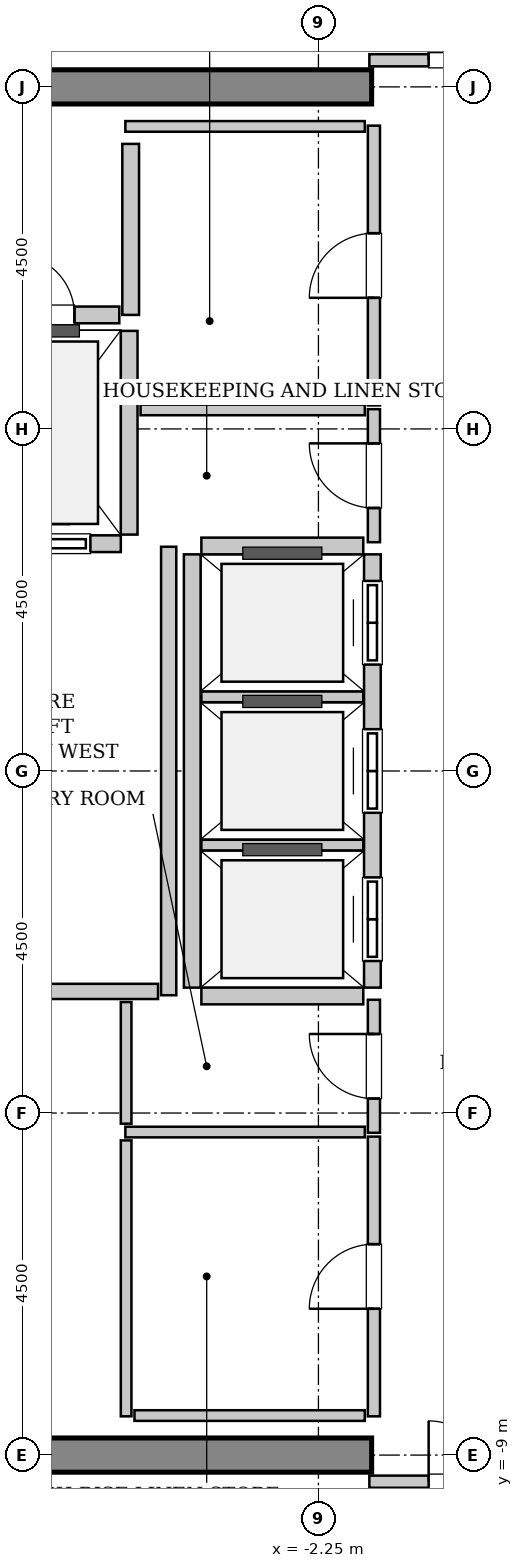
"""IFC4 building model, lengths in metres.
Left out: names, types, materials, properties, quantities, classifications, styles, units other than length and angle.
Written with IfcOpenShell. Run it as: python <this file> out.ifc"""

import sys

from ifc_helpers import new_model, si_unit, direction, frame, frame_2d, origin, place, context, subcontext, project, spatial, rectangle, extrude, source, transform, mapped, element, fill, save


model = new_model("IFC4")
c1 = context("Model", 3, precision=1e-05, world=origin(), true_north=direction((0.0, 1.0)))
c2 = subcontext(c1, "Body", "Model", "MODEL_VIEW")
j1 = project(units=[si_unit("LENGTHUNIT", "METRE"), si_unit("PLANEANGLEUNIT", "RADIAN")], contexts=[c1])
p1 = place(None, origin())
s1 = spatial("IfcSite", under=j1, at=p1, CompositionType="ELEMENT")
p2 = place(p1, origin())
s2 = spatial("IfcBuilding", under=s1, at=p2, CompositionType="ELEMENT")
p3 = place(p2, frame((0.0, 0.0, 295.0)))
s3 = spatial("IfcBuildingStorey", under=s2, at=p3, CompositionType="ELEMENT", Elevation=295.0)
m1 = source(origin(), c2, "Body", "SweptSolid", [
    extrude(rectangle(XDim=9.925, YDim=0.45, at=frame_2d((4.962, 0.0))), origin(), (0.0, 0.0, 1.0), 3.8),
])
for number, where, z_axis, x_axis in (
    (1, (-11.475, 9.0, 0.0), (0.0, 0.0, 1.0), (1.0, 0.0, 0.0)),
    (2, (-11.475, -9.0, 0.0), (0.0, 0.0, 1.0), (1.0, 0.0, 0.0)),
):
    element("IfcWall", number, at=place(p3, frame(where, z_axis=z_axis, x_axis=x_axis)), inside=s3, PredefinedType="SHEAR", context=c2, shape_type="MappedRepresentation", body=[
        mapped(m1, transform((0.0, 0.0, 0.0), x_axis=(1.0, 0.0, 0.0), y_axis=(0.0, 1.0, 0.0), z_axis=(0.0, 0.0, 1.0), scale=1.0)),
    ])
m2 = source(origin(), c2, "Body", "SweptSolid", [
    extrude(rectangle(XDim=2.0, YDim=0.22, at=frame_2d((1.0, 0.0))), origin(), (0.0, 0.0, 1.0), 3.535),
])
p4 = place(p3, frame((-6.85, 2.99, 0.0), z_axis=(0.0, 0.0, 1.0), x_axis=(1.0, 0.0, 0.0)))
e3 = element("IfcWall", 3, at=p4, inside=s3, PredefinedType="SOLIDWALL", context=c2, shape_type="MappedRepresentation", body=[
    mapped(m2, transform((0.0, 0.0, 0.0), x_axis=(1.0, 0.0, 0.0), y_axis=(0.0, 1.0, 0.0), z_axis=(0.0, 0.0, 1.0), scale=1.0)),
])
p5 = place(p4, frame((0.4, 0.0, 0.0)))
e4 = element("IfcOpeningElement", 4, at=p5, cuts=e3, PredefinedType="OPENING", context=c2, shape_type="SweptSolid", body=[
    extrude(rectangle(XDim=1.2, YDim=2.2, at=frame_2d((0.6, 1.1))), frame((0.0, 0.12, 0.0), z_axis=(0.0, -1.0, 0.0), x_axis=(1.0, 0.0, 0.0)), (0.0, 0.0, 1.0), 0.24),
])
m3 = source(origin(), c2, "Body", "SweptSolid", [
    extrude(rectangle(XDim=2.68, YDim=0.22, at=frame_2d((1.34, 0.0))), origin(), (0.0, 0.0, 1.0), 3.535),
])
p6 = place(p3, frame((-4.74, 3.11, 0.0), z_axis=(0.0, 0.0, 1.0), x_axis=(0.0, 1.0, 0.0)))
e5 = element("IfcWall", 5, at=p6, inside=s3, PredefinedType="SOLIDWALL", context=c2, shape_type="MappedRepresentation", body=[
    mapped(m3, transform((0.0, 0.0, 0.0), x_axis=(1.0, 0.0, 0.0), y_axis=(0.0, 1.0, 0.0), z_axis=(0.0, 0.0, 1.0), scale=1.0)),
])
m4 = source(origin(), c2, "Body", "SweptSolid", [
    extrude(rectangle(XDim=5.7, YDim=0.22, at=frame_2d((2.85, 0.0))), origin(), (0.0, 0.0, 1.0), 3.535),
])
p7 = place(p3, frame((-1.54, -2.85, 0.0), z_axis=(0.0, 0.0, 1.0), x_axis=(0.0, 1.0, 0.0)))
e6 = element("IfcWall", 6, at=p7, inside=s3, PredefinedType="SOLIDWALL", context=c2, shape_type="MappedRepresentation", body=[
    mapped(m4, transform((0.0, 0.0, 0.0), x_axis=(1.0, 0.0, 0.0), y_axis=(0.0, 1.0, 0.0), z_axis=(0.0, 0.0, 1.0), scale=1.0)),
])
p8 = place(p7, frame((0.35, 0.0, 0.0)))
e7 = element("IfcOpeningElement", 7, at=p8, cuts=e6, PredefinedType="OPENING", context=c2, shape_type="SweptSolid", body=[
    extrude(rectangle(XDim=1.1, YDim=2.2, at=frame_2d((0.55, 1.1))), frame((0.0, 0.12, 0.0), z_axis=(0.0, -1.0, 0.0), x_axis=(1.0, 0.0, 0.0)), (0.0, 0.0, 1.0), 0.24),
])
p9 = place(p7, frame((2.3, 0.0, 0.0)))
e8 = element("IfcOpeningElement", 8, at=p9, cuts=e6, PredefinedType="OPENING", context=c2, shape_type="SweptSolid", body=[
    extrude(rectangle(XDim=1.1, YDim=2.2, at=frame_2d((0.55, 1.1))), frame((0.0, 0.12, 0.0), z_axis=(0.0, -1.0, 0.0), x_axis=(1.0, 0.0, 0.0)), (0.0, 0.0, 1.0), 0.24),
])
p10 = place(p7, frame((4.25, 0.0, 0.0)))
e9 = element("IfcOpeningElement", 9, at=p10, cuts=e6, PredefinedType="OPENING", context=c2, shape_type="SweptSolid", body=[
    extrude(rectangle(XDim=1.1, YDim=2.2, at=frame_2d((0.55, 1.1))), frame((0.0, 0.12, 0.0), z_axis=(0.0, -1.0, 0.0), x_axis=(1.0, 0.0, 0.0)), (0.0, 0.0, 1.0), 0.24),
])
p11 = place(p3, frame((-3.91, 2.85, 0.0), z_axis=(0.0, 0.0, 1.0), x_axis=(0.0, -1.0, 0.0)))
e10 = element("IfcWall", 10, at=p11, inside=s3, PredefinedType="SOLIDWALL", context=c2, shape_type="MappedRepresentation", body=[
    mapped(m4, transform((0.0, 0.0, 0.0), x_axis=(1.0, 0.0, 0.0), y_axis=(0.0, 1.0, 0.0), z_axis=(0.0, 0.0, 1.0), scale=1.0)),
])
m5 = source(origin(), c2, "Body", "SweptSolid", [
    extrude(rectangle(XDim=2.13, YDim=0.22, at=frame_2d((1.065, 0.0))), origin(), (0.0, 0.0, 1.0), 3.535),
])
p12 = place(p3, frame((-3.79, -2.96, 0.0), z_axis=(0.0, 0.0, 1.0), x_axis=(1.0, 0.0, 0.0)))
e11 = element("IfcWall", 11, at=p12, inside=s3, PredefinedType="SOLIDWALL", context=c2, shape_type="MappedRepresentation", body=[
    mapped(m5, transform((0.0, 0.0, 0.0), x_axis=(1.0, 0.0, 0.0), y_axis=(0.0, 1.0, 0.0), z_axis=(0.0, 0.0, 1.0), scale=1.0)),
])
m6 = source(origin(), c2, "Body", "SweptSolid", [
    extrude(rectangle(XDim=2.13, YDim=0.14, at=frame_2d((1.065, 0.0))), origin(), (0.0, 0.0, 1.0), 3.535),
])
for number, where, z_axis, x_axis in (
    (12, (-3.79, -0.975, 0.0), (0.0, 0.0, 1.0), (1.0, 0.0, 0.0)),
    (13, (-3.79, 0.975, 0.0), (0.0, 0.0, 1.0), (1.0, 0.0, 0.0)),
):
    element("IfcWall", number, at=place(p3, frame(where, z_axis=z_axis, x_axis=x_axis)), inside=s3, PredefinedType="PARTITIONING", context=c2, shape_type="MappedRepresentation", body=[
        mapped(m6, transform((0.0, 0.0, 0.0), x_axis=(1.0, 0.0, 0.0), y_axis=(0.0, 1.0, 0.0), z_axis=(0.0, 0.0, 1.0), scale=1.0)),
    ])
p13 = place(p3, frame((-1.66, 2.96, 0.0), z_axis=(0.0, 0.0, 1.0), x_axis=(-1.0, 0.0, 0.0)))
e14 = element("IfcWall", 14, at=p13, inside=s3, PredefinedType="SOLIDWALL", context=c2, shape_type="MappedRepresentation", body=[
    mapped(m5, transform((0.0, 0.0, 0.0), x_axis=(1.0, 0.0, 0.0), y_axis=(0.0, 1.0, 0.0), z_axis=(0.0, 0.0, 1.0), scale=1.0)),
])
m7 = source(origin(), c2, "Body", "SweptSolid", [
    extrude(rectangle(XDim=2.25, YDim=0.22, at=frame_2d((1.125, 0.0))), origin(), (0.0, 0.0, 1.0), 3.535),
])
p14 = place(p3, frame((-4.72, 6.0, 0.0), z_axis=(0.0, 0.0, 1.0), x_axis=(0.0, 1.0, 0.0)))
e15 = element("IfcWall", 15, at=p14, inside=s3, PredefinedType="SOLIDWALL", context=c2, shape_type="MappedRepresentation", body=[
    mapped(m7, transform((0.0, 0.0, 0.0), x_axis=(1.0, 0.0, 0.0), y_axis=(0.0, 1.0, 0.0), z_axis=(0.0, 0.0, 1.0), scale=1.0)),
])
m8 = source(origin(), c2, "Body", "SweptSolid", [
    extrude(rectangle(XDim=1.98, YDim=0.22, at=frame_2d((0.99, 0.0))), origin(), (0.0, 0.0, 1.0), 3.535),
])
p15 = place(p3, frame((-6.85, 6.0, 0.0), z_axis=(0.0, 0.0, 1.0), x_axis=(1.0, 0.0, 0.0)))
e16 = element("IfcWall", 16, at=p15, inside=s3, PredefinedType="SOLIDWALL", context=c2, shape_type="MappedRepresentation", body=[
    mapped(m8, transform((0.0, 0.0, 0.0), x_axis=(1.0, 0.0, 0.0), y_axis=(0.0, 1.0, 0.0), z_axis=(0.0, 0.0, 1.0), scale=1.0)),
])
p16 = place(p15, frame((0.59, 0.0, 0.0)))
e17 = element("IfcOpeningElement", 17, at=p16, cuts=e16, PredefinedType="OPENING", context=c2, shape_type="SweptSolid", body=[
    extrude(rectangle(XDim=0.8, YDim=2.0, at=frame_2d((0.4, 1.0))), frame((0.0, 0.12, 0.0), z_axis=(0.0, -1.0, 0.0), x_axis=(1.0, 0.0, 0.0)), (0.0, 0.0, 1.0), 0.24),
])
m9 = source(origin(), c2, "Body", "SweptSolid", [
    extrude(rectangle(XDim=5.9, YDim=0.2, at=frame_2d((2.95, 0.0))), origin(), (0.0, 0.0, 1.0), 3.535),
])
p17 = place(p3, frame((-4.22, -2.95, 0.0), z_axis=(0.0, 0.0, 1.0), x_axis=(0.0, 1.0, 0.0)))
e18 = element("IfcWall", 18, at=p17, inside=s3, PredefinedType="PARTITIONING", context=c2, shape_type="MappedRepresentation", body=[
    mapped(m9, transform((0.0, 0.0, 0.0), x_axis=(1.0, 0.0, 0.0), y_axis=(0.0, 1.0, 0.0), z_axis=(0.0, 0.0, 1.0), scale=1.0)),
])
m10 = source(origin(), c2, "Body", "SweptSolid", [
    extrude(rectangle(XDim=2.9, YDim=0.2, at=frame_2d((1.45, 0.0))), origin(), (0.0, 0.0, 1.0), 3.535),
])
p18 = place(p3, frame((-7.26, -2.9, 0.0), z_axis=(0.0, 0.0, 1.0), x_axis=(1.0, 0.0, 0.0)))
e19 = element("IfcWall", 19, at=p18, inside=s3, PredefinedType="PARTITIONING", context=c2, shape_type="MappedRepresentation", body=[
    mapped(m10, transform((0.0, 0.0, 0.0), x_axis=(1.0, 0.0, 0.0), y_axis=(0.0, 1.0, 0.0), z_axis=(0.0, 0.0, 1.0), scale=1.0)),
])
m11 = source(origin(), c2, "Body", "SweptSolid", [
    extrude(rectangle(XDim=3.16, YDim=0.16, at=frame_2d((1.58, 0.0))), origin(), (0.0, 0.0, 1.0), 2.625),
])
p19 = place(p3, frame((-1.58, 9.35, 0.0), z_axis=(0.0, 0.0, 1.0), x_axis=(1.0, 0.0, 0.0)))
e20 = element("IfcWall", 20, at=p19, inside=s3, PredefinedType="PARTITIONING", context=c2, shape_type="MappedRepresentation", body=[
    mapped(m11, transform((0.0, 0.0, 0.0), x_axis=(1.0, 0.0, 0.0), y_axis=(0.0, 1.0, 0.0), z_axis=(0.0, 0.0, 1.0), scale=1.0)),
])
p20 = place(p19, frame((0.78, 0.0, 0.0)))
e21 = element("IfcOpeningElement", 21, at=p20, cuts=e20, PredefinedType="OPENING", context=c2, shape_type="SweptSolid", body=[
    extrude(rectangle(XDim=1.6, YDim=2.3, at=frame_2d((0.8, 1.15))), frame((0.0, 0.09, 0.0), z_axis=(0.0, -1.0, 0.0), x_axis=(1.0, 0.0, 0.0)), (0.0, 0.0, 1.0), 0.18),
])
p21 = place(p3, frame((-1.58, -9.35, 0.0), z_axis=(0.0, 0.0, 1.0), x_axis=(1.0, 0.0, 0.0)))
e22 = element("IfcWall", 22, at=p21, inside=s3, PredefinedType="PARTITIONING", context=c2, shape_type="MappedRepresentation", body=[
    mapped(m11, transform((0.0, 0.0, 0.0), x_axis=(1.0, 0.0, 0.0), y_axis=(0.0, 1.0, 0.0), z_axis=(0.0, 0.0, 1.0), scale=1.0)),
])
p22 = place(p21, frame((0.78, 0.0, 0.0)))
e23 = element("IfcOpeningElement", 23, at=p22, cuts=e22, PredefinedType="OPENING", context=c2, shape_type="SweptSolid", body=[
    extrude(rectangle(XDim=1.6, YDim=2.3, at=frame_2d((0.8, 1.15))), frame((0.0, 0.09, 0.0), z_axis=(0.0, -1.0, 0.0), x_axis=(1.0, 0.0, 0.0)), (0.0, 0.0, 1.0), 0.18),
])
m12 = source(origin(), c2, "Body", "SweptSolid", [
    extrude(rectangle(XDim=1.75, YDim=0.16, at=frame_2d((0.875, 0.0))), origin(), (0.0, 0.0, 1.0), 3.535),
])
p23 = place(p3, frame((-1.52, 3.01, 0.0), z_axis=(0.0, 0.0, 1.0), x_axis=(0.0, 1.0, 0.0)))
e24 = element("IfcWall", 24, at=p23, inside=s3, PredefinedType="PARTITIONING", context=c2, shape_type="MappedRepresentation", body=[
    mapped(m12, transform((0.0, 0.0, 0.0), x_axis=(1.0, 0.0, 0.0), y_axis=(0.0, 1.0, 0.0), z_axis=(0.0, 0.0, 1.0), scale=1.0)),
])
p24 = place(p23, frame((0.45, 0.0, 0.0)))
e25 = element("IfcOpeningElement", 25, at=p24, cuts=e24, PredefinedType="OPENING", context=c2, shape_type="SweptSolid", body=[
    extrude(rectangle(XDim=0.85, YDim=2.1, at=frame_2d((0.425, 1.05))), frame((0.0, 0.09, 0.0), z_axis=(0.0, -1.0, 0.0), x_axis=(1.0, 0.0, 0.0)), (0.0, 0.0, 1.0), 0.18),
])
m13 = source(origin(), c2, "Body", "SweptSolid", [
    extrude(rectangle(XDim=2.95, YDim=0.14, at=frame_2d((1.475, 0.0))), origin(), (0.0, 0.0, 1.0), 3.535),
])
p25 = place(p3, frame((-4.59, 4.75, 0.0), z_axis=(0.0, 0.0, 1.0), x_axis=(1.0, 0.0, 0.0)))
e26 = element("IfcWall", 26, at=p25, inside=s3, PredefinedType="PARTITIONING", context=c2, shape_type="MappedRepresentation", body=[
    mapped(m13, transform((0.0, 0.0, 0.0), x_axis=(1.0, 0.0, 0.0), y_axis=(0.0, 1.0, 0.0), z_axis=(0.0, 0.0, 1.0), scale=1.0)),
])
m14 = source(origin(), c2, "Body", "SweptSolid", [
    extrude(rectangle(XDim=3.68, YDim=0.16, at=frame_2d((1.84, 0.0))), origin(), (0.0, 0.0, 1.0), 3.535),
])
p26 = place(p3, frame((-1.52, 4.81, 0.0), z_axis=(0.0, 0.0, 1.0), x_axis=(0.0, 1.0, 0.0)))
e27 = element("IfcWall", 27, at=p26, inside=s3, PredefinedType="PARTITIONING", context=c2, shape_type="MappedRepresentation", body=[
    mapped(m14, transform((0.0, 0.0, 0.0), x_axis=(1.0, 0.0, 0.0), y_axis=(0.0, 1.0, 0.0), z_axis=(0.0, 0.0, 1.0), scale=1.0)),
])
p27 = place(p26, frame((1.415, 0.0, 0.0)))
e28 = element("IfcOpeningElement", 28, at=p27, cuts=e27, PredefinedType="OPENING", context=c2, shape_type="SweptSolid", body=[
    extrude(rectangle(XDim=0.85, YDim=2.1, at=frame_2d((0.425, 1.05))), frame((0.0, 0.09, 0.0), z_axis=(0.0, -1.0, 0.0), x_axis=(1.0, 0.0, 0.0)), (0.0, 0.0, 1.0), 0.18),
])
m15 = source(origin(), c2, "Body", "SweptSolid", [
    extrude(rectangle(XDim=3.15, YDim=0.14, at=frame_2d((1.575, 0.0))), origin(), (0.0, 0.0, 1.0), 3.535),
])
p28 = place(p3, frame((-4.79, 8.48, 0.0), z_axis=(0.0, 0.0, 1.0), x_axis=(1.0, 0.0, 0.0)))
e29 = element("IfcWall", 29, at=p28, inside=s3, PredefinedType="PARTITIONING", context=c2, shape_type="MappedRepresentation", body=[
    mapped(m15, transform((0.0, 0.0, 0.0), x_axis=(1.0, 0.0, 0.0), y_axis=(0.0, 1.0, 0.0), z_axis=(0.0, 0.0, 1.0), scale=1.0)),
])
p29 = place(p3, frame((-1.52, -4.76, 0.0), z_axis=(0.0, 0.0, 1.0), x_axis=(0.0, 1.0, 0.0)))
e30 = element("IfcWall", 30, at=p29, inside=s3, PredefinedType="PARTITIONING", context=c2, shape_type="MappedRepresentation", body=[
    mapped(m12, transform((0.0, 0.0, 0.0), x_axis=(1.0, 0.0, 0.0), y_axis=(0.0, 1.0, 0.0), z_axis=(0.0, 0.0, 1.0), scale=1.0)),
])
p30 = place(p29, frame((0.45, 0.0, 0.0)))
e31 = element("IfcOpeningElement", 31, at=p30, cuts=e30, PredefinedType="OPENING", context=c2, shape_type="SweptSolid", body=[
    extrude(rectangle(XDim=0.85, YDim=2.1, at=frame_2d((0.425, 1.05))), frame((0.0, 0.09, 0.0), z_axis=(0.0, -1.0, 0.0), x_axis=(1.0, 0.0, 0.0)), (0.0, 0.0, 1.0), 0.18),
])
p31 = place(p3, frame((-4.79, -4.75, 0.0), z_axis=(0.0, 0.0, 1.0), x_axis=(1.0, 0.0, 0.0)))
e32 = element("IfcWall", 32, at=p31, inside=s3, PredefinedType="PARTITIONING", context=c2, shape_type="MappedRepresentation", body=[
    mapped(m15, transform((0.0, 0.0, 0.0), x_axis=(1.0, 0.0, 0.0), y_axis=(0.0, 1.0, 0.0), z_axis=(0.0, 0.0, 1.0), scale=1.0)),
])
m16 = source(origin(), c2, "Body", "SweptSolid", [
    extrude(rectangle(XDim=1.6, YDim=0.14, at=frame_2d((0.8, 0.0))), origin(), (0.0, 0.0, 1.0), 3.535),
])
p32 = place(p3, frame((-4.78, -4.64, 0.0), z_axis=(0.0, 0.0, 1.0), x_axis=(0.0, 1.0, 0.0)))
e33 = element("IfcWall", 33, at=p32, inside=s3, PredefinedType="PARTITIONING", context=c2, shape_type="MappedRepresentation", body=[
    mapped(m16, transform((0.0, 0.0, 0.0), x_axis=(1.0, 0.0, 0.0), y_axis=(0.0, 1.0, 0.0), z_axis=(0.0, 0.0, 1.0), scale=1.0)),
])
p33 = place(p3, frame((-1.52, -8.49, 0.0), z_axis=(0.0, 0.0, 1.0), x_axis=(0.0, 1.0, 0.0)))
e34 = element("IfcWall", 34, at=p33, inside=s3, PredefinedType="PARTITIONING", context=c2, shape_type="MappedRepresentation", body=[
    mapped(m14, transform((0.0, 0.0, 0.0), x_axis=(1.0, 0.0, 0.0), y_axis=(0.0, 1.0, 0.0), z_axis=(0.0, 0.0, 1.0), scale=1.0)),
])
p34 = place(p33, frame((1.415, 0.0, 0.0)))
e35 = element("IfcOpeningElement", 35, at=p34, cuts=e34, PredefinedType="OPENING", context=c2, shape_type="SweptSolid", body=[
    extrude(rectangle(XDim=0.85, YDim=2.1, at=frame_2d((0.425, 1.05))), frame((0.0, 0.09, 0.0), z_axis=(0.0, -1.0, 0.0), x_axis=(1.0, 0.0, 0.0)), (0.0, 0.0, 1.0), 0.18),
])
m17 = source(origin(), c2, "Body", "SweptSolid", [
    extrude(rectangle(XDim=3.63, YDim=0.14, at=frame_2d((1.815, 0.0))), origin(), (0.0, 0.0, 1.0), 3.535),
])
p35 = place(p3, frame((-4.78, -8.49, 0.0), z_axis=(0.0, 0.0, 1.0), x_axis=(0.0, 1.0, 0.0)))
e36 = element("IfcWall", 36, at=p35, inside=s3, PredefinedType="PARTITIONING", context=c2, shape_type="MappedRepresentation", body=[
    mapped(m17, transform((0.0, 0.0, 0.0), x_axis=(1.0, 0.0, 0.0), y_axis=(0.0, 1.0, 0.0), z_axis=(0.0, 0.0, 1.0), scale=1.0)),
])
m18 = source(origin(), c2, "Body", "SweptSolid", [
    extrude(rectangle(XDim=3.03, YDim=0.14, at=frame_2d((1.515, 0.0))), origin(), (0.0, 0.0, 1.0), 3.535),
])
p36 = place(p3, frame((-4.67, -8.48, 0.0), z_axis=(0.0, 0.0, 1.0), x_axis=(1.0, 0.0, 0.0)))
e37 = element("IfcWall", 37, at=p36, inside=s3, PredefinedType="PARTITIONING", context=c2, shape_type="MappedRepresentation", body=[
    mapped(m18, transform((0.0, 0.0, 0.0), x_axis=(1.0, 0.0, 0.0), y_axis=(0.0, 1.0, 0.0), z_axis=(0.0, 0.0, 1.0), scale=1.0)),
])
m19 = source(origin(), c2, "Body", "SweptSolid", [
    extrude(rectangle(XDim=1.2, YDim=2.2, at=frame_2d((0.6, 1.1))), frame((0.0, 0.025, 0.0), z_axis=(0.0, -1.0, 0.0), x_axis=(1.0, 0.0, 0.0)), (0.0, 0.0, 1.0), 0.05),
])
p37 = place(p5, origin())
e38 = element("IfcDoor", 38, at=p37, inside=s3, OperationType="SLIDING_TO_LEFT", PredefinedType="DOOR", context=c2, shape_type="MappedRepresentation", body=[
    mapped(m19, transform((0.0, 0.0, 0.0), x_axis=(1.0, 0.0, 0.0), y_axis=(0.0, 1.0, 0.0), z_axis=(0.0, 0.0, 1.0), scale=1.0)),
])
fill(e4, e38)
m20 = source(origin(), c2, "Body", "SweptSolid", [
    extrude(rectangle(XDim=1.1, YDim=2.2, at=frame_2d((0.55, 1.1))), frame((0.0, 0.025, 0.0), z_axis=(0.0, -1.0, 0.0), x_axis=(1.0, 0.0, 0.0)), (0.0, 0.0, 1.0), 0.05),
])
p38 = place(p8, origin())
e39 = element("IfcDoor", 39, at=p38, inside=s3, OperationType="DOUBLE_DOOR_SLIDING", PredefinedType="DOOR", context=c2, shape_type="MappedRepresentation", body=[
    mapped(m20, transform((0.0, 0.0, 0.0), x_axis=(1.0, 0.0, 0.0), y_axis=(0.0, 1.0, 0.0), z_axis=(0.0, 0.0, 1.0), scale=1.0)),
])
fill(e7, e39)
p39 = place(p9, origin())
e40 = element("IfcDoor", 40, at=p39, inside=s3, OperationType="DOUBLE_DOOR_SLIDING", PredefinedType="DOOR", context=c2, shape_type="MappedRepresentation", body=[
    mapped(m20, transform((0.0, 0.0, 0.0), x_axis=(1.0, 0.0, 0.0), y_axis=(0.0, 1.0, 0.0), z_axis=(0.0, 0.0, 1.0), scale=1.0)),
])
fill(e8, e40)
p40 = place(p10, origin())
e41 = element("IfcDoor", 41, at=p40, inside=s3, OperationType="DOUBLE_DOOR_SLIDING", PredefinedType="DOOR", context=c2, shape_type="MappedRepresentation", body=[
    mapped(m20, transform((0.0, 0.0, 0.0), x_axis=(1.0, 0.0, 0.0), y_axis=(0.0, 1.0, 0.0), z_axis=(0.0, 0.0, 1.0), scale=1.0)),
])
fill(e9, e41)
m21 = source(origin(), c2, "Body", "SweptSolid", [
    extrude(rectangle(XDim=0.8, YDim=2.0, at=frame_2d((0.4, 1.0))), frame((0.0, 0.025, 0.0), z_axis=(0.0, -1.0, 0.0), x_axis=(1.0, 0.0, 0.0)), (0.0, 0.0, 1.0), 0.05),
])
p41 = place(p16, origin())
e42 = element("IfcDoor", 42, at=p41, inside=s3, OperationType="SINGLE_SWING_LEFT", PredefinedType="TRAPDOOR", context=c2, shape_type="MappedRepresentation", body=[
    mapped(m21, transform((0.0, 0.0, 0.0), x_axis=(1.0, 0.0, 0.0), y_axis=(0.0, 1.0, 0.0), z_axis=(0.0, 0.0, 1.0), scale=1.0)),
])
fill(e17, e42)
m22 = source(origin(), c2, "Body", "SweptSolid", [
    extrude(rectangle(XDim=1.6, YDim=2.3, at=frame_2d((0.8, 1.15))), frame((0.0, 0.025, 0.0), z_axis=(0.0, -1.0, 0.0), x_axis=(1.0, 0.0, 0.0)), (0.0, 0.0, 1.0), 0.05),
])
p42 = place(p20, origin())
e43 = element("IfcDoor", 43, at=p42, inside=s3, OperationType="DOUBLE_DOOR_SINGLE_SWING", PredefinedType="DOOR", context=c2, shape_type="MappedRepresentation", body=[
    mapped(m22, transform((0.0, 0.0, 0.0), x_axis=(1.0, 0.0, 0.0), y_axis=(0.0, 1.0, 0.0), z_axis=(0.0, 0.0, 1.0), scale=1.0)),
])
fill(e21, e43)
p43 = place(p22, origin())
e44 = element("IfcDoor", 44, at=p43, inside=s3, OperationType="DOUBLE_DOOR_SINGLE_SWING", PredefinedType="DOOR", context=c2, shape_type="MappedRepresentation", body=[
    mapped(m22, transform((0.0, 0.0, 0.0), x_axis=(1.0, 0.0, 0.0), y_axis=(0.0, 1.0, 0.0), z_axis=(0.0, 0.0, 1.0), scale=1.0)),
])
fill(e23, e44)
m23 = source(origin(), c2, "Body", "SweptSolid", [
    extrude(rectangle(XDim=0.85, YDim=2.1, at=frame_2d((0.425, 1.05))), frame((0.0, 0.025, 0.0), z_axis=(0.0, -1.0, 0.0), x_axis=(1.0, 0.0, 0.0)), (0.0, 0.0, 1.0), 0.05),
])
p44 = place(p24, origin())
e45 = element("IfcDoor", 45, at=p44, inside=s3, OperationType="SINGLE_SWING_RIGHT", PredefinedType="DOOR", context=c2, shape_type="MappedRepresentation", body=[
    mapped(m23, transform((0.0, 0.0, 0.0), x_axis=(1.0, 0.0, 0.0), y_axis=(0.0, 1.0, 0.0), z_axis=(0.0, 0.0, 1.0), scale=1.0)),
])
fill(e25, e45)
p45 = place(p27, origin())
e46 = element("IfcDoor", 46, at=p45, inside=s3, OperationType="SINGLE_SWING_LEFT", PredefinedType="DOOR", context=c2, shape_type="MappedRepresentation", body=[
    mapped(m23, transform((0.0, 0.0, 0.0), x_axis=(1.0, 0.0, 0.0), y_axis=(0.0, 1.0, 0.0), z_axis=(0.0, 0.0, 1.0), scale=1.0)),
])
fill(e28, e46)
p46 = place(p30, origin())
e47 = element("IfcDoor", 47, at=p46, inside=s3, OperationType="SINGLE_SWING_RIGHT", PredefinedType="DOOR", context=c2, shape_type="MappedRepresentation", body=[
    mapped(m23, transform((0.0, 0.0, 0.0), x_axis=(1.0, 0.0, 0.0), y_axis=(0.0, 1.0, 0.0), z_axis=(0.0, 0.0, 1.0), scale=1.0)),
])
fill(e31, e47)
p47 = place(p34, origin())
e48 = element("IfcDoor", 48, at=p47, inside=s3, OperationType="SINGLE_SWING_LEFT", PredefinedType="DOOR", context=c2, shape_type="MappedRepresentation", body=[
    mapped(m23, transform((0.0, 0.0, 0.0), x_axis=(1.0, 0.0, 0.0), y_axis=(0.0, 1.0, 0.0), z_axis=(0.0, 0.0, 1.0), scale=1.0)),
])
fill(e35, e48)
save(model, sys.argv[1])
